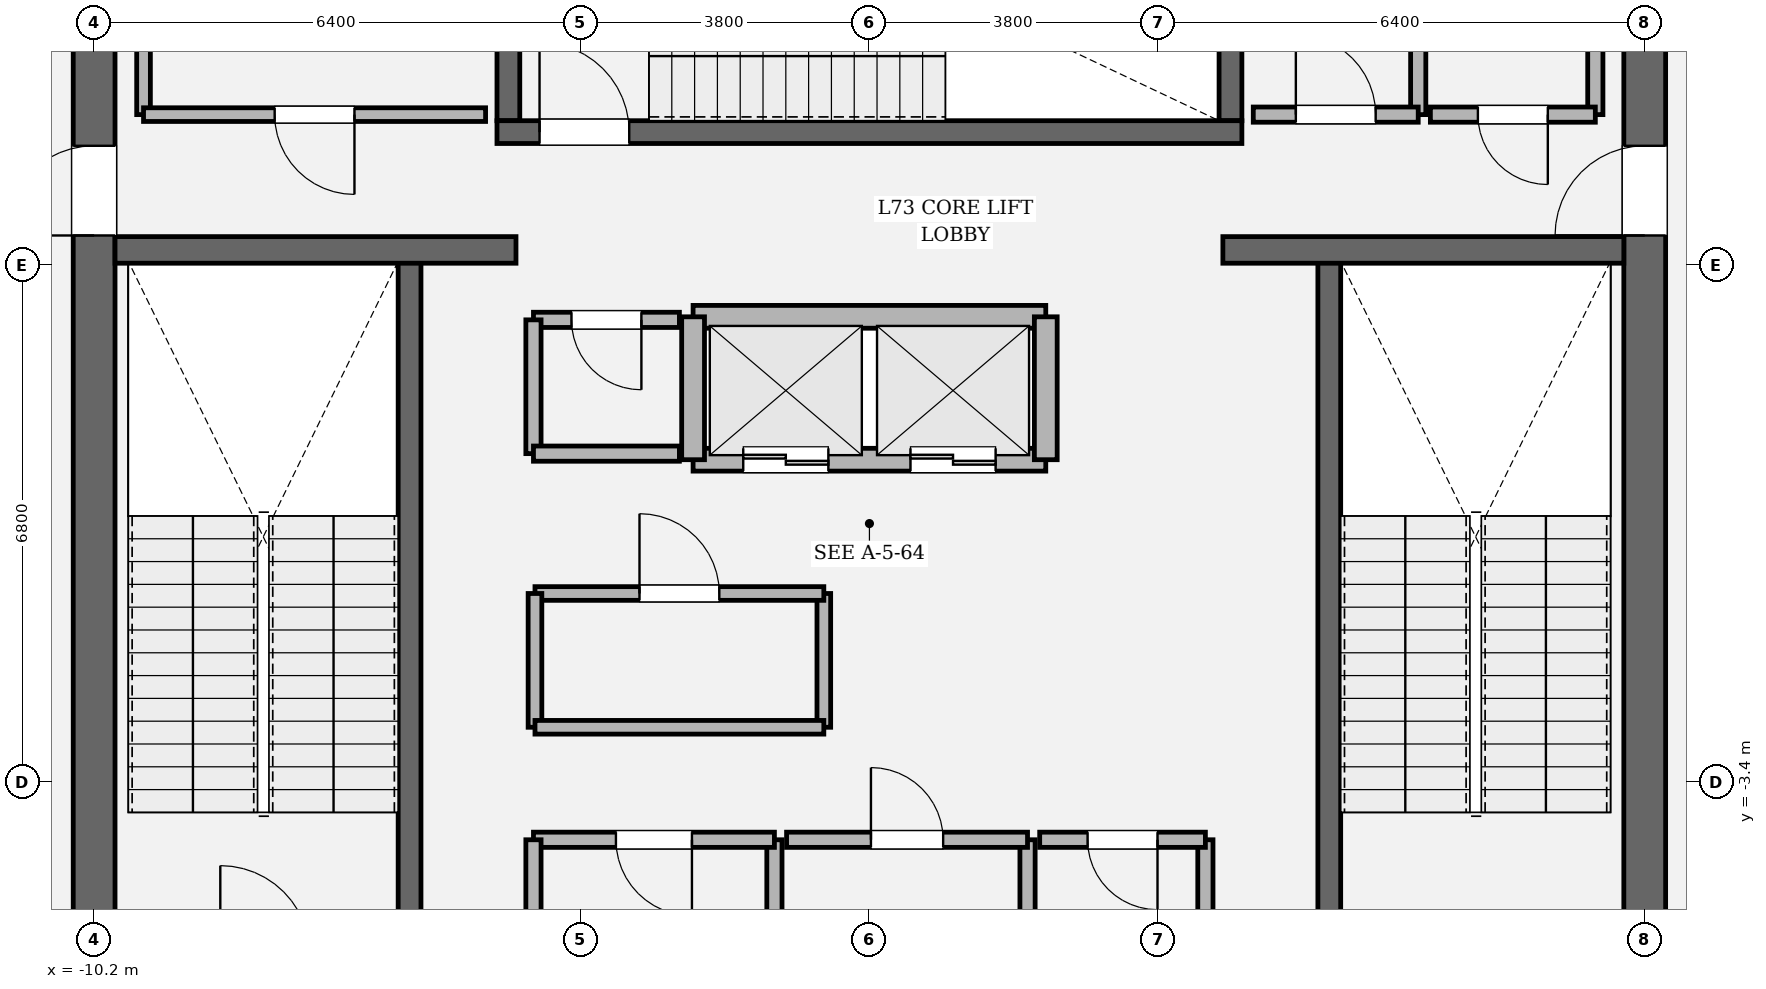
"""IFC4 building model, lengths in metres.
Left out: names, types, materials, properties, quantities, classifications, styles, units other than length and angle.
Written with IfcOpenShell. Run it as: python <this file> out.ifc"""

import sys

from ifc_helpers import new_model, si_unit, direction, frame, frame_2d, origin, place, context, subcontext, project, spatial, rectangle, extrude, element, fill, save


model = new_model("IFC4")
c1 = context("Model", 3, precision=1e-05, world=origin(), true_north=direction((0.0, 1.0)))
c2 = subcontext(c1, "Body", "Model", "MODEL_VIEW")
j1 = project(units=[si_unit("LENGTHUNIT", "METRE"), si_unit("PLANEANGLEUNIT", "RADIAN")], contexts=[c1])
p1 = place(None, origin())
s1 = spatial("IfcSite", under=j1, at=p1, CompositionType="ELEMENT")
p2 = place(p1, origin())
s2 = spatial("IfcBuilding", under=s1, at=p2, CompositionType="ELEMENT")
p3 = place(p2, frame((0.0, 0.0, 309.0)))
s3 = spatial("IfcBuildingStorey", under=s2, at=p3, CompositionType="ELEMENT", Elevation=309.0)
p4 = place(p3, frame((-10.2, -8.925, 0.0), z_axis=(0.0, 0.0, 1.0), x_axis=(0.0, 1.0, 0.0)))
e1 = element("IfcWall", 1, at=p4, inside=s3, PredefinedType="SHEAR", context=c2, shape_type="SweptSolid", body=[
    extrude(rectangle(XDim=17.85, YDim=0.55, at=frame_2d((8.925, 0.0))), origin(), (0.0, 0.0, 1.0), 4.2),
])
p5 = place(p4, frame((12.715, 0.0, 0.0)))
e2 = element("IfcOpeningElement", 2, at=p5, cuts=e1, PredefinedType="OPENING", context=c2, shape_type="SweptSolid", body=[
    extrude(rectangle(XDim=1.18, YDim=2.2, at=frame_2d((0.59, 1.1))), frame((0.0, 0.285, 0.0), z_axis=(0.0, -1.0, 0.0), x_axis=(1.0, 0.0, 0.0)), (0.0, 0.0, 1.0), 0.57),
])
p6 = place(p3, frame((10.2, 8.925, 0.0), z_axis=(0.0, 0.0, 1.0), x_axis=(0.0, -1.0, 0.0)))
e3 = element("IfcWall", 3, at=p6, inside=s3, PredefinedType="SHEAR", context=c2, shape_type="SweptSolid", body=[
    extrude(rectangle(XDim=17.85, YDim=0.55, at=frame_2d((8.925, 0.0))), origin(), (0.0, 0.0, 1.0), 4.2),
])
p7 = place(p6, frame((3.955, 0.0, 0.0)))
e4 = element("IfcOpeningElement", 4, at=p7, cuts=e3, PredefinedType="OPENING", context=c2, shape_type="SweptSolid", body=[
    extrude(rectangle(XDim=1.18, YDim=2.2, at=frame_2d((0.59, 1.1))), frame((0.0, 0.285, 0.0), z_axis=(0.0, -1.0, 0.0), x_axis=(1.0, 0.0, 0.0)), (0.0, 0.0, 1.0), 0.57),
])
for number, where, z_axis, x_axis in (
    (5, (-6.05, -5.5, 0.0), (0.0, 0.0, 1.0), (0.0, 1.0, 0.0)),
    (6, (6.05, 3.45, 0.0), (0.0, 0.0, 1.0), (0.0, -1.0, 0.0)),
):
    element("IfcWall", number, at=place(p3, frame(where, z_axis=z_axis, x_axis=x_axis)), inside=s3, PredefinedType="SOLIDWALL", context=c2, shape_type="SweptSolid", body=[
        extrude(rectangle(XDim=8.95, YDim=0.3, at=frame_2d((4.475, 0.0))), origin(), (0.0, 0.0, 1.0), 4.2),
    ])
for number, where, z_axis, x_axis in (
    (7, (-4.75, 5.3, 0.0), (0.0, 0.0, 1.0), (0.0, 1.0, 0.0)),
    (8, (4.75, 8.925, 0.0), (0.0, 0.0, 1.0), (0.0, -1.0, 0.0)),
):
    element("IfcWall", number, at=place(p3, frame(where, z_axis=z_axis, x_axis=x_axis)), inside=s3, PredefinedType="SOLIDWALL", context=c2, shape_type="SweptSolid", body=[
        extrude(rectangle(XDim=3.625, YDim=0.3, at=frame_2d((1.812, 0.0))), origin(), (0.0, 0.0, 1.0), 4.2),
    ])
p8 = place(p3, frame((-4.9, 5.15, 0.0), z_axis=(0.0, 0.0, 1.0), x_axis=(1.0, 0.0, 0.0)))
e9 = element("IfcWall", 9, at=p8, inside=s3, PredefinedType="SOLIDWALL", context=c2, shape_type="SweptSolid", body=[
    extrude(rectangle(XDim=9.8, YDim=0.3, at=frame_2d((4.9, 0.0))), origin(), (0.0, 0.0, 1.0), 4.2),
])
p9 = place(p8, frame((0.56, 0.0, 0.0)))
e10 = element("IfcOpeningElement", 10, at=p9, cuts=e9, PredefinedType="OPENING", context=c2, shape_type="SweptSolid", body=[
    extrude(rectangle(XDim=1.18, YDim=2.2, at=frame_2d((0.59, 1.1))), frame((0.0, 0.16, 0.0), z_axis=(0.0, -1.0, 0.0), x_axis=(1.0, 0.0, 0.0)), (0.0, 0.0, 1.0), 0.32),
])
for number, where, z_axis, x_axis in (
    (11, (-9.925, 3.6, 0.0), (0.0, 0.0, 1.0), (1.0, 0.0, 0.0)),
    (12, (4.65, 3.6, 0.0), (0.0, 0.0, 1.0), (1.0, 0.0, 0.0)),
):
    element("IfcWall", number, at=place(p3, frame(where, z_axis=z_axis, x_axis=x_axis)), inside=s3, PredefinedType="SOLIDWALL", context=c2, shape_type="SweptSolid", body=[
        extrude(rectangle(XDim=5.275, YDim=0.35, at=frame_2d((2.638, 0.0))), origin(), (0.0, 0.0, 1.0), 4.2),
    ])
p10 = place(p3, frame((-2.32, 0.84, 0.0), z_axis=(0.0, 0.0, 1.0), x_axis=(1.0, 0.0, 0.0)))
e13 = element("IfcWall", 13, at=p10, inside=s3, PredefinedType="SOLIDWALL", context=c2, shape_type="SweptSolid", body=[
    extrude(rectangle(XDim=4.64, YDim=0.3, at=frame_2d((2.32, 0.0))), origin(), (0.0, 0.0, 1.0), 4.0),
])
p11 = place(p10, frame((0.66, 0.0, 0.0)))
e14 = element("IfcOpeningElement", 14, at=p11, cuts=e13, PredefinedType="OPENING", context=c2, shape_type="SweptSolid", body=[
    extrude(rectangle(XDim=1.12, YDim=2.25, at=frame_2d((0.56, 1.125))), frame((0.0, 0.16, 0.0), z_axis=(0.0, -1.0, 0.0), x_axis=(1.0, 0.0, 0.0)), (0.0, 0.0, 1.0), 0.32),
])
p12 = place(p10, frame((2.86, 0.0, 0.0)))
e15 = element("IfcOpeningElement", 15, at=p12, cuts=e13, PredefinedType="OPENING", context=c2, shape_type="SweptSolid", body=[
    extrude(rectangle(XDim=1.12, YDim=2.25, at=frame_2d((0.56, 1.125))), frame((0.0, 0.16, 0.0), z_axis=(0.0, -1.0, 0.0), x_axis=(1.0, 0.0, 0.0)), (0.0, 0.0, 1.0), 0.32),
])
p13 = place(p3, frame((-2.32, 2.72, 0.0), z_axis=(0.0, 0.0, 1.0), x_axis=(1.0, 0.0, 0.0)))
e16 = element("IfcWall", 16, at=p13, inside=s3, PredefinedType="SOLIDWALL", context=c2, shape_type="SweptSolid", body=[
    extrude(rectangle(XDim=4.64, YDim=0.3, at=frame_2d((2.32, 0.0))), origin(), (0.0, 0.0, 1.0), 4.0),
])
for number, where, z_axis, x_axis in (
    (17, (-2.32, 0.84, 0.0), (0.0, 0.0, 1.0), (0.0, 1.0, 0.0)),
    (18, (2.32, 0.84, 0.0), (0.0, 0.0, 1.0), (0.0, 1.0, 0.0)),
):
    element("IfcWall", number, at=place(p3, frame(where, z_axis=z_axis, x_axis=x_axis)), inside=s3, PredefinedType="SOLIDWALL", context=c2, shape_type="SweptSolid", body=[
        extrude(rectangle(XDim=1.88, YDim=0.3, at=frame_2d((0.94, 0.0))), origin(), (0.0, 0.0, 1.0), 4.0),
    ])
p14 = place(p3, frame((-1.25, -5.9, 0.0), z_axis=(0.0, 0.0, 1.0), x_axis=(0.0, 1.0, 0.0)))
e19 = element("IfcWall", 19, at=p14, inside=s3, PredefinedType="SOLIDWALL", context=c2, shape_type="SweptSolid", body=[
    extrude(rectangle(XDim=1.74, YDim=0.2, at=frame_2d((0.87, 0.0))), origin(), (0.0, 0.0, 1.0), 4.0),
])
p15 = place(p3, frame((-1.25, -4.16, 0.0), z_axis=(0.0, 0.0, 1.0), x_axis=(-1.0, 0.0, 0.0)))
e20 = element("IfcWall", 20, at=p15, inside=s3, PredefinedType="SOLIDWALL", context=c2, shape_type="SweptSolid", body=[
    extrude(rectangle(XDim=3.17, YDim=0.2, at=frame_2d((1.585, 0.0))), origin(), (0.0, 0.0, 1.0), 4.0),
])
p16 = place(p15, frame((1.085, 0.0, 0.0)))
e21 = element("IfcOpeningElement", 21, at=p16, cuts=e20, PredefinedType="OPENING", context=c2, shape_type="SweptSolid", body=[
    extrude(rectangle(XDim=1.0, YDim=2.15, at=frame_2d((0.5, 1.075))), frame((0.0, 0.11, 0.0), z_axis=(0.0, -1.0, 0.0), x_axis=(1.0, 0.0, 0.0)), (0.0, 0.0, 1.0), 0.22),
])
for number, where, z_axis, x_axis in (
    (22, (-4.42, -4.16, 0.0), (0.0, 0.0, 1.0), (0.0, -1.0, 0.0)),
    (23, (2.08, -5.9, 0.0), (0.0, 0.0, 1.0), (0.0, 1.0, 0.0)),
):
    element("IfcWall", number, at=place(p3, frame(where, z_axis=z_axis, x_axis=x_axis)), inside=s3, PredefinedType="SOLIDWALL", context=c2, shape_type="SweptSolid", body=[
        extrude(rectangle(XDim=1.74, YDim=0.2, at=frame_2d((0.87, 0.0))), origin(), (0.0, 0.0, 1.0), 4.0),
    ])
p17 = place(p3, frame((2.08, -4.16, 0.0), z_axis=(0.0, 0.0, 1.0), x_axis=(-1.0, 0.0, 0.0)))
e24 = element("IfcWall", 24, at=p17, inside=s3, PredefinedType="SOLIDWALL", context=c2, shape_type="SweptSolid", body=[
    extrude(rectangle(XDim=3.17, YDim=0.2, at=frame_2d((1.585, 0.0))), origin(), (0.0, 0.0, 1.0), 4.0),
])
p18 = place(p17, frame((1.11, 0.0, 0.0)))
e25 = element("IfcOpeningElement", 25, at=p18, cuts=e24, PredefinedType="OPENING", context=c2, shape_type="SweptSolid", body=[
    extrude(rectangle(XDim=0.95, YDim=2.15, at=frame_2d((0.475, 1.075))), frame((0.0, 0.11, 0.0), z_axis=(0.0, -1.0, 0.0), x_axis=(1.0, 0.0, 0.0)), (0.0, 0.0, 1.0), 0.22),
])
p19 = place(p3, frame((4.42, -5.9, 0.0), z_axis=(0.0, 0.0, 1.0), x_axis=(0.0, 1.0, 0.0)))
e26 = element("IfcWall", 26, at=p19, inside=s3, PredefinedType="SOLIDWALL", context=c2, shape_type="SweptSolid", body=[
    extrude(rectangle(XDim=1.74, YDim=0.2, at=frame_2d((0.87, 0.0))), origin(), (0.0, 0.0, 1.0), 4.0),
])
p20 = place(p3, frame((4.42, -4.16, 0.0), z_axis=(0.0, 0.0, 1.0), x_axis=(-1.0, 0.0, 0.0)))
e27 = element("IfcWall", 27, at=p20, inside=s3, PredefinedType="SOLIDWALL", context=c2, shape_type="SweptSolid", body=[
    extrude(rectangle(XDim=2.18, YDim=0.2, at=frame_2d((1.09, 0.0))), origin(), (0.0, 0.0, 1.0), 4.0),
])
p21 = place(p20, frame((0.63, 0.0, 0.0)))
e28 = element("IfcOpeningElement", 28, at=p21, cuts=e27, PredefinedType="OPENING", context=c2, shape_type="SweptSolid", body=[
    extrude(rectangle(XDim=0.92, YDim=2.1, at=frame_2d((0.46, 1.05))), frame((0.0, 0.11, 0.0), z_axis=(0.0, -1.0, 0.0), x_axis=(1.0, 0.0, 0.0)), (0.0, 0.0, 1.0), 0.22),
])
p22 = place(p3, frame((-0.6, -2.68, 0.0), z_axis=(0.0, 0.0, 1.0), x_axis=(0.0, 1.0, 0.0)))
e29 = element("IfcWall", 29, at=p22, inside=s3, PredefinedType="PARTITIONING", context=c2, shape_type="SweptSolid", body=[
    extrude(rectangle(XDim=1.76, YDim=0.18, at=frame_2d((0.88, 0.0))), origin(), (0.0, 0.0, 1.0), 4.0),
])
p23 = place(p3, frame((-0.6, -0.92, 0.0), z_axis=(0.0, 0.0, 1.0), x_axis=(-1.0, 0.0, 0.0)))
e30 = element("IfcWall", 30, at=p23, inside=s3, PredefinedType="PARTITIONING", context=c2, shape_type="SweptSolid", body=[
    extrude(rectangle(XDim=3.8, YDim=0.18, at=frame_2d((1.9, 0.0))), origin(), (0.0, 0.0, 1.0), 4.0),
])
p24 = place(p23, frame((1.375, 0.0, 0.0)))
e31 = element("IfcOpeningElement", 31, at=p24, cuts=e30, PredefinedType="OPENING", context=c2, shape_type="SweptSolid", body=[
    extrude(rectangle(XDim=1.05, YDim=2.2, at=frame_2d((0.525, 1.1))), frame((0.0, 0.1, 0.0), z_axis=(0.0, -1.0, 0.0), x_axis=(1.0, 0.0, 0.0)), (0.0, 0.0, 1.0), 0.2),
])
p25 = place(p3, frame((-4.4, -0.92, 0.0), z_axis=(0.0, 0.0, 1.0), x_axis=(0.0, -1.0, 0.0)))
e32 = element("IfcWall", 32, at=p25, inside=s3, PredefinedType="PARTITIONING", context=c2, shape_type="SweptSolid", body=[
    extrude(rectangle(XDim=1.76, YDim=0.18, at=frame_2d((0.88, 0.0))), origin(), (0.0, 0.0, 1.0), 4.0),
])
p26 = place(p3, frame((-4.4, -2.68, 0.0), z_axis=(0.0, 0.0, 1.0), x_axis=(1.0, 0.0, 0.0)))
e33 = element("IfcWall", 33, at=p26, inside=s3, PredefinedType="PARTITIONING", context=c2, shape_type="SweptSolid", body=[
    extrude(rectangle(XDim=3.8, YDim=0.18, at=frame_2d((1.9, 0.0))), origin(), (0.0, 0.0, 1.0), 4.0),
])
p27 = place(p3, frame((-2.5, 2.68, 0.0), z_axis=(0.0, 0.0, 1.0), x_axis=(-1.0, 0.0, 0.0)))
e34 = element("IfcWall", 34, at=p27, inside=s3, PredefinedType="SOLIDWALL", context=c2, shape_type="SweptSolid", body=[
    extrude(rectangle(XDim=1.92, YDim=0.2, at=frame_2d((0.96, 0.0))), origin(), (0.0, 0.0, 1.0), 4.0),
])
p28 = place(p27, frame((0.5, 0.0, 0.0)))
e35 = element("IfcOpeningElement", 35, at=p28, cuts=e34, PredefinedType="OPENING", context=c2, shape_type="SweptSolid", body=[
    extrude(rectangle(XDim=0.92, YDim=2.1, at=frame_2d((0.46, 1.05))), frame((0.0, 0.11, 0.0), z_axis=(0.0, -1.0, 0.0), x_axis=(1.0, 0.0, 0.0)), (0.0, 0.0, 1.0), 0.22),
])
p29 = place(p3, frame((-4.42, 2.68, 0.0), z_axis=(0.0, 0.0, 1.0), x_axis=(0.0, -1.0, 0.0)))
e36 = element("IfcWall", 36, at=p29, inside=s3, PredefinedType="SOLIDWALL", context=c2, shape_type="SweptSolid", body=[
    extrude(rectangle(XDim=1.76, YDim=0.2, at=frame_2d((0.88, 0.0))), origin(), (0.0, 0.0, 1.0), 4.0),
])
p30 = place(p3, frame((-4.42, 0.92, 0.0), z_axis=(0.0, 0.0, 1.0), x_axis=(1.0, 0.0, 0.0)))
e37 = element("IfcWall", 37, at=p30, inside=s3, PredefinedType="SOLIDWALL", context=c2, shape_type="SweptSolid", body=[
    extrude(rectangle(XDim=1.92, YDim=0.2, at=frame_2d((0.96, 0.0))), origin(), (0.0, 0.0, 1.0), 4.0),
])
p31 = place(p3, frame((-9.55, 8.65, 0.0), z_axis=(0.0, 0.0, 1.0), x_axis=(0.0, -1.0, 0.0)))
e38 = element("IfcWall", 38, at=p31, inside=s3, PredefinedType="PARTITIONING", context=c2, shape_type="SweptSolid", body=[
    extrude(rectangle(XDim=3.27, YDim=0.18, at=frame_2d((1.635, 0.0))), origin(), (0.0, 0.0, 1.0), 4.0),
])
p32 = place(p3, frame((-9.55, 5.38, 0.0), z_axis=(0.0, 0.0, 1.0), x_axis=(1.0, 0.0, 0.0)))
e39 = element("IfcWall", 39, at=p32, inside=s3, PredefinedType="PARTITIONING", context=c2, shape_type="SweptSolid", body=[
    extrude(rectangle(XDim=4.5, YDim=0.18, at=frame_2d((2.25, 0.0))), origin(), (0.0, 0.0, 1.0), 4.0),
])
p33 = place(p32, frame((1.725, 0.0, 0.0)))
e40 = element("IfcOpeningElement", 40, at=p33, cuts=e39, PredefinedType="OPENING", context=c2, shape_type="SweptSolid", body=[
    extrude(rectangle(XDim=1.05, YDim=2.2, at=frame_2d((0.525, 1.1))), frame((0.0, 0.1, 0.0), z_axis=(0.0, -1.0, 0.0), x_axis=(1.0, 0.0, 0.0)), (0.0, 0.0, 1.0), 0.2),
])
p34 = place(p3, frame((7.22, 5.38, 0.0), z_axis=(0.0, 0.0, 1.0), x_axis=(0.0, 1.0, 0.0)))
e41 = element("IfcWall", 41, at=p34, inside=s3, PredefinedType="SOLIDWALL", context=c2, shape_type="SweptSolid", body=[
    extrude(rectangle(XDim=3.27, YDim=0.2, at=frame_2d((1.635, 0.0))), origin(), (0.0, 0.0, 1.0), 4.0),
])
p35 = place(p3, frame((5.05, 5.38, 0.0), z_axis=(0.0, 0.0, 1.0), x_axis=(1.0, 0.0, 0.0)))
e42 = element("IfcWall", 42, at=p35, inside=s3, PredefinedType="SOLIDWALL", context=c2, shape_type="SweptSolid", body=[
    extrude(rectangle(XDim=2.17, YDim=0.2, at=frame_2d((1.085, 0.0))), origin(), (0.0, 0.0, 1.0), 4.0),
])
p36 = place(p35, frame((0.56, 0.0, 0.0)))
e43 = element("IfcOpeningElement", 43, at=p36, cuts=e42, PredefinedType="OPENING", context=c2, shape_type="SweptSolid", body=[
    extrude(rectangle(XDim=1.05, YDim=2.2, at=frame_2d((0.525, 1.1))), frame((0.0, 0.11, 0.0), z_axis=(0.0, -1.0, 0.0), x_axis=(1.0, 0.0, 0.0)), (0.0, 0.0, 1.0), 0.22),
])
p37 = place(p3, frame((9.55, 5.38, 0.0), z_axis=(0.0, 0.0, 1.0), x_axis=(0.0, 1.0, 0.0)))
e44 = element("IfcWall", 44, at=p37, inside=s3, PredefinedType="SOLIDWALL", context=c2, shape_type="SweptSolid", body=[
    extrude(rectangle(XDim=3.27, YDim=0.2, at=frame_2d((1.635, 0.0))), origin(), (0.0, 0.0, 1.0), 4.0),
])
p38 = place(p3, frame((7.38, 5.38, 0.0), z_axis=(0.0, 0.0, 1.0), x_axis=(1.0, 0.0, 0.0)))
e45 = element("IfcWall", 45, at=p38, inside=s3, PredefinedType="SOLIDWALL", context=c2, shape_type="SweptSolid", body=[
    extrude(rectangle(XDim=2.17, YDim=0.2, at=frame_2d((1.085, 0.0))), origin(), (0.0, 0.0, 1.0), 4.0),
])
p39 = place(p38, frame((0.625, 0.0, 0.0)))
e46 = element("IfcOpeningElement", 46, at=p39, cuts=e45, PredefinedType="OPENING", context=c2, shape_type="SweptSolid", body=[
    extrude(rectangle(XDim=0.92, YDim=2.1, at=frame_2d((0.46, 1.05))), frame((0.0, 0.11, 0.0), z_axis=(0.0, -1.0, 0.0), x_axis=(1.0, 0.0, 0.0)), (0.0, 0.0, 1.0), 0.22),
])
p40 = place(p9, origin())
e47 = element("IfcDoor", 47, at=p40, inside=s3, OperationType="SINGLE_SWING_LEFT", PredefinedType="DOOR", context=c2, shape_type="SweptSolid", body=[
    extrude(rectangle(XDim=1.18, YDim=2.2, at=frame_2d((0.59, 1.1))), frame((0.0, 0.025, 0.0), z_axis=(0.0, -1.0, 0.0), x_axis=(1.0, 0.0, 0.0)), (0.0, 0.0, 1.0), 0.05),
])
fill(e10, e47)
p41 = place(p5, origin())
e48 = element("IfcDoor", 48, at=p41, inside=s3, OperationType="SINGLE_SWING_LEFT", PredefinedType="DOOR", context=c2, shape_type="SweptSolid", body=[
    extrude(rectangle(XDim=1.18, YDim=2.2, at=frame_2d((0.59, 1.1))), frame((0.0, 0.025, 0.0), z_axis=(0.0, -1.0, 0.0), x_axis=(1.0, 0.0, 0.0)), (0.0, 0.0, 1.0), 0.05),
])
fill(e2, e48)
p42 = place(p7, origin())
e49 = element("IfcDoor", 49, at=p42, inside=s3, OperationType="SINGLE_SWING_RIGHT", PredefinedType="DOOR", context=c2, shape_type="SweptSolid", body=[
    extrude(rectangle(XDim=1.18, YDim=2.2, at=frame_2d((0.59, 1.1))), frame((0.0, 0.025, 0.0), z_axis=(0.0, -1.0, 0.0), x_axis=(1.0, 0.0, 0.0)), (0.0, 0.0, 1.0), 0.05),
])
fill(e4, e49)
p43 = place(p11, origin())
e50 = element("IfcDoor", 50, at=p43, inside=s3, OperationType="DOUBLE_DOOR_SLIDING", PredefinedType="DOOR", context=c2, shape_type="SweptSolid", body=[
    extrude(rectangle(XDim=1.12, YDim=2.25, at=frame_2d((0.56, 1.125))), frame((0.0, 0.025, 0.0), z_axis=(0.0, -1.0, 0.0), x_axis=(1.0, 0.0, 0.0)), (0.0, 0.0, 1.0), 0.05),
])
fill(e14, e50)
p44 = place(p12, origin())
e51 = element("IfcDoor", 51, at=p44, inside=s3, OperationType="DOUBLE_DOOR_SLIDING", PredefinedType="DOOR", context=c2, shape_type="SweptSolid", body=[
    extrude(rectangle(XDim=1.12, YDim=2.25, at=frame_2d((0.56, 1.125))), frame((0.0, 0.025, 0.0), z_axis=(0.0, -1.0, 0.0), x_axis=(1.0, 0.0, 0.0)), (0.0, 0.0, 1.0), 0.05),
])
fill(e15, e51)
p45 = place(p16, origin())
e52 = element("IfcDoor", 52, at=p45, inside=s3, OperationType="SINGLE_SWING_LEFT", PredefinedType="DOOR", context=c2, shape_type="SweptSolid", body=[
    extrude(rectangle(XDim=1.0, YDim=2.15, at=frame_2d((0.5, 1.075))), frame((0.0, 0.025, 0.0), z_axis=(0.0, -1.0, 0.0), x_axis=(1.0, 0.0, 0.0)), (0.0, 0.0, 1.0), 0.05),
])
fill(e21, e52)
p46 = place(p18, origin())
e53 = element("IfcDoor", 53, at=p46, inside=s3, OperationType="SINGLE_SWING_RIGHT", PredefinedType="DOOR", context=c2, shape_type="SweptSolid", body=[
    extrude(rectangle(XDim=0.95, YDim=2.15, at=frame_2d((0.475, 1.075))), frame((0.0, 0.025, 0.0), z_axis=(0.0, -1.0, 0.0), x_axis=(1.0, 0.0, 0.0)), (0.0, 0.0, 1.0), 0.05),
])
fill(e25, e53)
p47 = place(p21, origin())
e54 = element("IfcDoor", 54, at=p47, inside=s3, OperationType="SINGLE_SWING_LEFT", PredefinedType="DOOR", context=c2, shape_type="SweptSolid", body=[
    extrude(rectangle(XDim=0.92, YDim=2.1, at=frame_2d((0.46, 1.05))), frame((0.0, 0.025, 0.0), z_axis=(0.0, -1.0, 0.0), x_axis=(1.0, 0.0, 0.0)), (0.0, 0.0, 1.0), 0.05),
])
fill(e28, e54)
p48 = place(p24, origin())
e55 = element("IfcDoor", 55, at=p48, inside=s3, OperationType="SINGLE_SWING_RIGHT", PredefinedType="DOOR", context=c2, shape_type="SweptSolid", body=[
    extrude(rectangle(XDim=1.05, YDim=2.2, at=frame_2d((0.525, 1.1))), frame((0.0, 0.025, 0.0), z_axis=(0.0, -1.0, 0.0), x_axis=(1.0, 0.0, 0.0)), (0.0, 0.0, 1.0), 0.05),
])
fill(e31, e55)
p49 = place(p28, origin())
e56 = element("IfcDoor", 56, at=p49, inside=s3, OperationType="SINGLE_SWING_LEFT", PredefinedType="DOOR", context=c2, shape_type="SweptSolid", body=[
    extrude(rectangle(XDim=0.92, YDim=2.1, at=frame_2d((0.46, 1.05))), frame((0.0, 0.025, 0.0), z_axis=(0.0, -1.0, 0.0), x_axis=(1.0, 0.0, 0.0)), (0.0, 0.0, 1.0), 0.05),
])
fill(e35, e56)
p50 = place(p33, origin())
e57 = element("IfcDoor", 57, at=p50, inside=s3, OperationType="SINGLE_SWING_RIGHT", PredefinedType="DOOR", context=c2, shape_type="SweptSolid", body=[
    extrude(rectangle(XDim=1.05, YDim=2.2, at=frame_2d((0.525, 1.1))), frame((0.0, 0.025, 0.0), z_axis=(0.0, -1.0, 0.0), x_axis=(1.0, 0.0, 0.0)), (0.0, 0.0, 1.0), 0.05),
])
fill(e40, e57)
p51 = place(p36, origin())
e58 = element("IfcDoor", 58, at=p51, inside=s3, OperationType="SINGLE_SWING_LEFT", PredefinedType="DOOR", context=c2, shape_type="SweptSolid", body=[
    extrude(rectangle(XDim=1.05, YDim=2.2, at=frame_2d((0.525, 1.1))), frame((0.0, 0.025, 0.0), z_axis=(0.0, -1.0, 0.0), x_axis=(1.0, 0.0, 0.0)), (0.0, 0.0, 1.0), 0.05),
])
fill(e43, e58)
p52 = place(p39, origin())
e59 = element("IfcDoor", 59, at=p52, inside=s3, OperationType="SINGLE_SWING_RIGHT", PredefinedType="DOOR", context=c2, shape_type="SweptSolid", body=[
    extrude(rectangle(XDim=0.92, YDim=2.1, at=frame_2d((0.46, 1.05))), frame((0.0, 0.025, 0.0), z_axis=(0.0, -1.0, 0.0), x_axis=(1.0, 0.0, 0.0)), (0.0, 0.0, 1.0), 0.05),
])
fill(e46, e59)
save(model, sys.argv[1])
